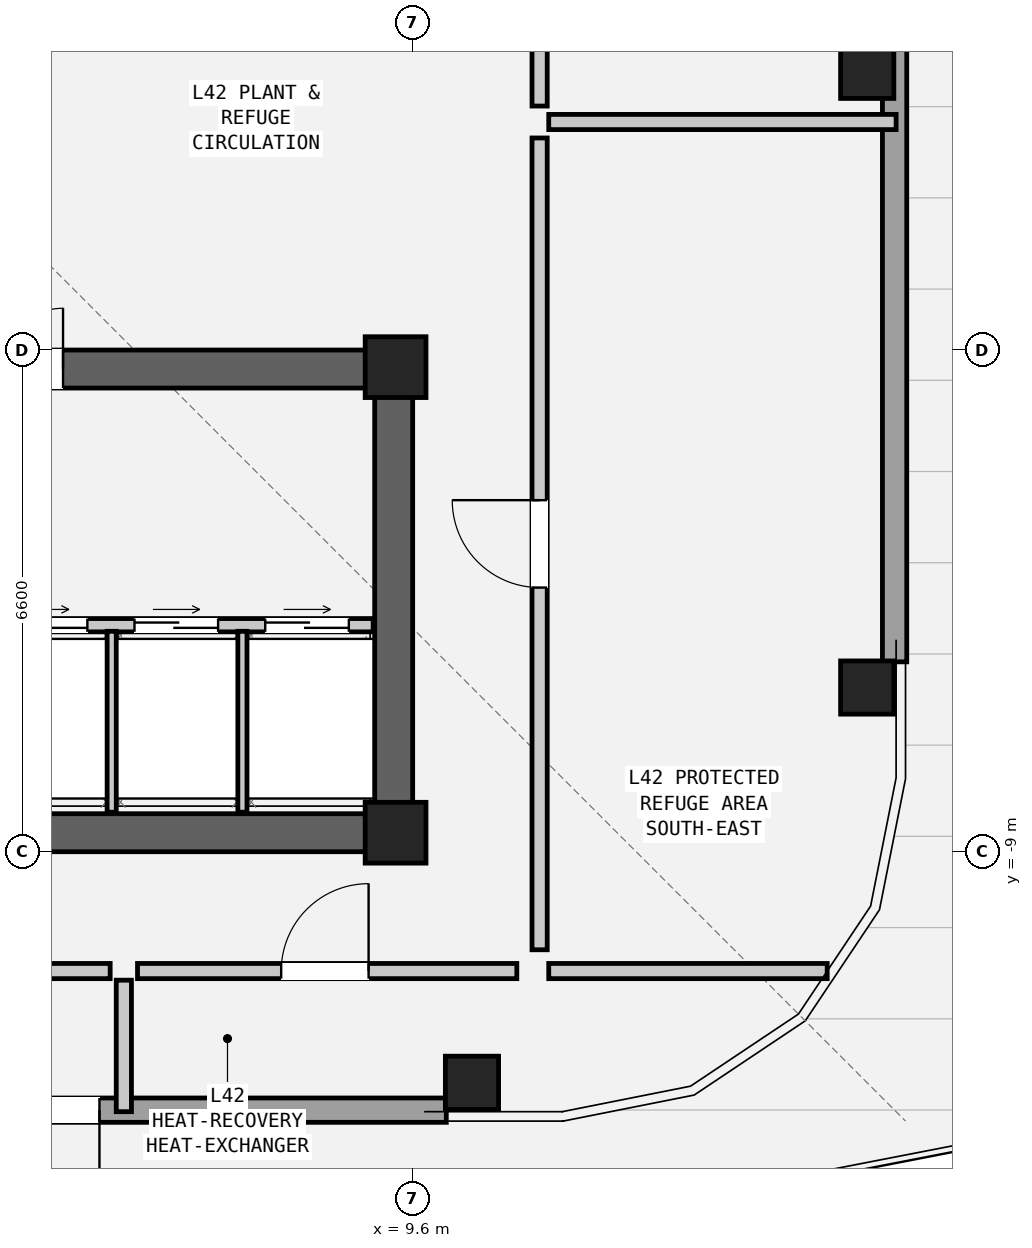
"""IFC4 building model, lengths in metres.
Left out: names, types, materials, properties, quantities, classifications, styles, units other than length and angle.
Written with IfcOpenShell. Run it as: python <this file> out.ifc"""

import sys

from ifc_helpers import new_model, si_unit, direction, frame, frame_2d, origin, origin_2d, place, context, subcontext, project, spatial, rectangle, hollow_rectangle, extrude, element, fill, save


model = new_model("IFC4")
c1 = context("Model", 3, precision=1e-05, world=origin(), true_north=direction((0.0, 1.0)))
c2 = subcontext(c1, "Body", "Model", "MODEL_VIEW")
j1 = project(units=[si_unit("LENGTHUNIT", "METRE"), si_unit("PLANEANGLEUNIT", "RADIAN")], contexts=[c1])
p1 = place(None, origin())
s1 = spatial("IfcSite", under=j1, at=p1, CompositionType="ELEMENT")
p2 = place(p1, origin())
s2 = spatial("IfcBuilding", under=s1, at=p2, CompositionType="ELEMENT")
p3 = place(p2, frame((0.0, 0.0, 144.6)))
s3 = spatial("IfcBuildingStorey", under=s2, at=p3, CompositionType="ELEMENT", Elevation=144.6)
p4 = place(p3, frame((-9.6, -8.75, 0.0), z_axis=(0.0, 0.0, 1.0), x_axis=(1.0, 0.0, 0.0)))
e1 = element("IfcWall", 1, at=p4, inside=s3, PredefinedType="SHEAR", context=c2, shape_type="SweptSolid", body=[
    extrude(rectangle(XDim=19.2, YDim=0.5, at=frame_2d((9.6, 0.0))), origin(), (0.0, 0.0, 1.0), 3.6),
])
p5 = place(p3, frame((-9.6, -2.65, 0.0), z_axis=(0.0, 0.0, 1.0), x_axis=(1.0, 0.0, 0.0)))
e2 = element("IfcWall", 2, at=p5, inside=s3, PredefinedType="SHEAR", context=c2, shape_type="SweptSolid", body=[
    extrude(rectangle(XDim=19.2, YDim=0.5, at=frame_2d((9.6, 0.0))), origin(), (0.0, 0.0, 1.0), 3.6),
])
p6 = place(p5, frame((3.8, 0.0, 0.0)))
e3 = element("IfcOpeningElement", 3, at=p6, cuts=e2, PredefinedType="OPENING", context=c2, shape_type="SweptSolid", body=[
    extrude(rectangle(XDim=1.1, YDim=2.08, at=frame_2d((0.55, 1.04))), frame((0.0, 0.262, 0.0), z_axis=(0.0, -1.0, 0.0), x_axis=(1.0, 0.0, 0.0)), (0.0, 0.0, 1.0), 0.524),
])
p7 = place(p5, frame((13.0, 0.0, 0.0)))
e4 = element("IfcOpeningElement", 4, at=p7, cuts=e2, PredefinedType="OPENING", context=c2, shape_type="SweptSolid", body=[
    extrude(rectangle(XDim=1.6, YDim=2.12, at=frame_2d((0.8, 1.06))), frame((0.0, 0.262, 0.0), z_axis=(0.0, -1.0, 0.0), x_axis=(1.0, 0.0, 0.0)), (0.0, 0.0, 1.0), 0.524),
])
p8 = place(p3, frame((9.35, -9.0, 0.0), z_axis=(0.0, 0.0, 1.0), x_axis=(0.0, 1.0, 0.0)))
e5 = element("IfcWall", 5, at=p8, inside=s3, PredefinedType="SHEAR", context=c2, shape_type="SweptSolid", body=[
    extrude(rectangle(XDim=6.6, YDim=0.5, at=frame_2d((3.3, 0.0))), origin(), (0.0, 0.0, 1.0), 3.6),
])
for number, where, z_axis, x_axis in (
    (6, (10.38, -12.04, 0.0), (0.0, 0.0, 1.0), (1.0, 0.0, 0.0)),
    (7, (15.58, -6.84, 0.0), (0.0, 0.0, 1.0), (0.0, 1.0, 0.0)),
    (8, (15.58, 1.26, 0.0), (0.0, 0.0, 1.0), (0.0, 1.0, 0.0)),
):
    element("IfcColumn", number, at=place(p3, frame(where, z_axis=z_axis, x_axis=x_axis)), inside=s3, PredefinedType="COLUMN", context=c2, shape_type="SweptSolid", body=[
        extrude(hollow_rectangle(XDim=0.7, YDim=0.7, WallThickness=0.045, at=origin_2d()), origin(), (0.0, 0.0, 1.0), 3.6),
    ])
for number, where, z_axis, x_axis in (
    (9, (9.375, -2.625, 0.0), (0.0, 0.0, 1.0), (1.0, 0.0, 0.0)),
    (10, (9.375, -8.75, 0.0), (0.0, 0.0, 1.0), (1.0, 0.0, 0.0)),
):
    element("IfcColumn", number, at=place(p3, frame(where, z_axis=z_axis, x_axis=x_axis)), inside=s3, PredefinedType="COLUMN", context=c2, shape_type="SweptSolid", body=[
        extrude(rectangle(XDim=0.8, YDim=0.8, at=origin_2d()), origin(), (0.0, 0.0, 1.0), 3.6),
    ])
p9 = place(p3, frame((10.042, -12.4, 0.0), z_axis=(0.0, 0.0, 1.0), x_axis=(-1.0, 0.0, 0.0)))
e11 = element("IfcWall", 11, at=p9, inside=s3, PredefinedType="SOLIDWALL", context=c2, shape_type="SweptSolid", body=[
    extrude(rectangle(XDim=23.624, YDim=0.32, at=frame_2d((11.812, 0.0))), origin(), (0.0, 0.0, 1.0), 2.242),
])
p10 = place(p9, frame((4.563, 0.0, 0.0)))
e12 = element("IfcOpeningElement", 12, at=p10, cuts=e11, PredefinedType="OPENING", context=c2, shape_type="SweptSolid", body=[
    extrude(rectangle(XDim=1.25, YDim=2.02, at=frame_2d((0.625, 1.01))), frame((0.0, 0.172, 0.0), z_axis=(0.0, -1.0, 0.0), x_axis=(1.0, 0.0, 0.0)), (0.0, 0.0, 1.0), 0.344),
])
p11 = place(p3, frame((15.94, 17.122, 0.0), z_axis=(0.0, 0.0, 1.0), x_axis=(0.0, -1.0, 0.0)))
e13 = element("IfcWall", 13, at=p11, inside=s3, PredefinedType="SOLIDWALL", context=c2, shape_type="SweptSolid", body=[
    extrude(rectangle(XDim=23.624, YDim=0.32, at=frame_2d((11.812, 0.0))), origin(), (0.0, 0.0, 1.0), 2.242),
])
p12 = place(p3, frame((0.0, -6.02, 0.0), z_axis=(0.0, 0.0, 1.0), x_axis=(1.0, 0.0, 0.0)))
e14 = element("IfcWall", 14, at=p12, inside=s3, PredefinedType="PARTITIONING", context=c2, shape_type="SweptSolid", body=[
    extrude(rectangle(XDim=9.08, YDim=0.175, at=frame_2d((4.54, 0.0))), origin(), (0.0, 0.0, 1.0), 3.38),
])
p13 = place(p12, frame((0.33, 0.0, 0.0)))
e15 = element("IfcOpeningElement", 15, at=p13, cuts=e14, PredefinedType="OPENING", context=c2, shape_type="SweptSolid", body=[
    extrude(rectangle(XDim=1.1, YDim=2.06, at=frame_2d((0.55, 1.03))), frame((0.0, 0.1, 0.0), z_axis=(0.0, -1.0, 0.0), x_axis=(1.0, 0.0, 0.0)), (0.0, 0.0, 1.0), 0.199),
])
p14 = place(p12, frame((2.3, 0.0, 0.0)))
e16 = element("IfcOpeningElement", 16, at=p14, cuts=e14, PredefinedType="OPENING", context=c2, shape_type="SweptSolid", body=[
    extrude(rectangle(XDim=1.1, YDim=2.06, at=frame_2d((0.55, 1.03))), frame((0.0, 0.1, 0.0), z_axis=(0.0, -1.0, 0.0), x_axis=(1.0, 0.0, 0.0)), (0.0, 0.0, 1.0), 0.199),
])
p15 = place(p12, frame((4.22, 0.0, 0.0)))
e17 = element("IfcOpeningElement", 17, at=p15, cuts=e14, PredefinedType="OPENING", context=c2, shape_type="SweptSolid", body=[
    extrude(rectangle(XDim=1.1, YDim=2.06, at=frame_2d((0.55, 1.03))), frame((0.0, 0.1, 0.0), z_axis=(0.0, -1.0, 0.0), x_axis=(1.0, 0.0, 0.0)), (0.0, 0.0, 1.0), 0.199),
])
p16 = place(p12, frame((5.94, 0.0, 0.0)))
e18 = element("IfcOpeningElement", 18, at=p16, cuts=e14, PredefinedType="OPENING", context=c2, shape_type="SweptSolid", body=[
    extrude(rectangle(XDim=1.1, YDim=2.06, at=frame_2d((0.55, 1.03))), frame((0.0, 0.1, 0.0), z_axis=(0.0, -1.0, 0.0), x_axis=(1.0, 0.0, 0.0)), (0.0, 0.0, 1.0), 0.199),
])
p17 = place(p12, frame((7.66, 0.0, 0.0)))
e19 = element("IfcOpeningElement", 19, at=p17, cuts=e14, PredefinedType="OPENING", context=c2, shape_type="SweptSolid", body=[
    extrude(rectangle(XDim=1.1, YDim=2.06, at=frame_2d((0.55, 1.03))), frame((0.0, 0.1, 0.0), z_axis=(0.0, -1.0, 0.0), x_axis=(1.0, 0.0, 0.0)), (0.0, 0.0, 1.0), 0.199),
])
for number, where, z_axis, x_axis in (
    (20, (5.64, -8.48, 0.0), (0.0, 0.0, 1.0), (0.0, 1.0, 0.0)),
    (21, (7.36, -8.48, 0.0), (0.0, 0.0, 1.0), (0.0, 1.0, 0.0)),
):
    element("IfcWall", number, at=place(p3, frame(where, z_axis=z_axis, x_axis=x_axis)), inside=s3, PredefinedType="PARTITIONING", context=c2, shape_type="SweptSolid", body=[
        extrude(rectangle(XDim=2.38, YDim=0.12, at=frame_2d((1.19, 0.0))), origin(), (0.0, 0.0, 1.0), 3.38),
    ])
p18 = place(p3, frame((0.53, -10.57, 0.0), z_axis=(0.0, 0.0, 1.0), x_axis=(1.0, 0.0, 0.0)))
e22 = element("IfcWall", 22, at=p18, inside=s3, PredefinedType="PARTITIONING", context=c2, shape_type="SweptSolid", body=[
    extrude(rectangle(XDim=5.09, YDim=0.2, at=frame_2d((2.545, 0.0))), origin(), (0.0, 0.0, 1.0), 3.38),
])
p19 = place(p18, frame((2.37, 0.0, 0.0)))
e23 = element("IfcOpeningElement", 23, at=p19, cuts=e22, PredefinedType="OPENING", context=c2, shape_type="SweptSolid", body=[
    extrude(rectangle(XDim=1.15, YDim=2.1, at=frame_2d((0.575, 1.05))), frame((0.0, 0.112, 0.0), z_axis=(0.0, -1.0, 0.0), x_axis=(1.0, 0.0, 0.0)), (0.0, 0.0, 1.0), 0.224),
])
p20 = place(p3, frame((5.8, -12.42, 0.0), z_axis=(0.0, 0.0, 1.0), x_axis=(0.0, 1.0, 0.0)))
e24 = element("IfcWall", 24, at=p20, inside=s3, PredefinedType="PARTITIONING", context=c2, shape_type="SweptSolid", body=[
    extrude(rectangle(XDim=1.73, YDim=0.2, at=frame_2d((0.865, 0.0))), origin(), (0.0, 0.0, 1.0), 2.901),
])
p21 = place(p3, frame((5.98, -10.57, 0.0), z_axis=(0.0, 0.0, 1.0), x_axis=(1.0, 0.0, 0.0)))
e25 = element("IfcWall", 25, at=p21, inside=s3, PredefinedType="PARTITIONING", context=c2, shape_type="SweptSolid", body=[
    extrude(rectangle(XDim=4.99, YDim=0.2, at=frame_2d((2.495, 0.0))), origin(), (0.0, 0.0, 1.0), 3.38),
])
p22 = place(p21, frame((1.89, 0.0, 0.0)))
e26 = element("IfcOpeningElement", 26, at=p22, cuts=e25, PredefinedType="OPENING", context=c2, shape_type="SweptSolid", body=[
    extrude(rectangle(XDim=1.15, YDim=2.1, at=frame_2d((0.575, 1.05))), frame((0.0, 0.112, 0.0), z_axis=(0.0, -1.0, 0.0), x_axis=(1.0, 0.0, 0.0)), (0.0, 0.0, 1.0), 0.224),
])
p23 = place(p3, frame((11.39, -10.57, 0.0), z_axis=(0.0, 0.0, 1.0), x_axis=(1.0, 0.0, 0.0)))
e27 = element("IfcWall", 27, at=p23, inside=s3, PredefinedType="PARTITIONING", context=c2, shape_type="SweptSolid", body=[
    extrude(rectangle(XDim=3.663, YDim=0.2, at=frame_2d((1.832, 0.0))), origin(), (0.0, 0.0, 1.0), 3.38),
])
p24 = place(p3, frame((11.39, 0.6, 0.0), z_axis=(0.0, 0.0, 1.0), x_axis=(1.0, 0.0, 0.0)))
e28 = element("IfcWall", 28, at=p24, inside=s3, PredefinedType="PARTITIONING", context=c2, shape_type="SweptSolid", body=[
    extrude(rectangle(XDim=4.57, YDim=0.2, at=frame_2d((2.285, 0.0))), origin(), (0.0, 0.0, 1.0), 2.901),
])
p25 = place(p3, frame((11.27, -10.29, 0.0), z_axis=(0.0, 0.0, 1.0), x_axis=(0.0, 1.0, 0.0)))
e29 = element("IfcWall", 29, at=p25, inside=s3, PredefinedType="PARTITIONING", context=c2, shape_type="SweptSolid", body=[
    extrude(rectangle(XDim=10.68, YDim=0.2, at=frame_2d((5.34, 0.0))), origin(), (0.0, 0.0, 1.0), 3.38),
])
p26 = place(p25, frame((4.765, 0.0, 0.0)))
e30 = element("IfcOpeningElement", 30, at=p26, cuts=e29, PredefinedType="OPENING", context=c2, shape_type="SweptSolid", body=[
    extrude(rectangle(XDim=1.15, YDim=2.1, at=frame_2d((0.575, 1.05))), frame((0.0, 0.112, 0.0), z_axis=(0.0, -1.0, 0.0), x_axis=(1.0, 0.0, 0.0)), (0.0, 0.0, 1.0), 0.224),
])
p27 = place(p3, frame((11.27, 0.81, 0.0), z_axis=(0.0, 0.0, 1.0), x_axis=(0.0, 1.0, 0.0)))
e31 = element("IfcWall", 31, at=p27, inside=s3, PredefinedType="PARTITIONING", context=c2, shape_type="SweptSolid", body=[
    extrude(rectangle(XDim=10.68, YDim=0.2, at=frame_2d((5.34, 0.0))), origin(), (0.0, 0.0, 1.0), 3.38),
])
p28 = place(p27, frame((6.047, 0.0, 0.0)))
e32 = element("IfcOpeningElement", 32, at=p28, cuts=e31, PredefinedType="OPENING", context=c2, shape_type="SweptSolid", body=[
    extrude(rectangle(XDim=1.15, YDim=2.1, at=frame_2d((0.575, 1.05))), frame((0.0, 0.112, 0.0), z_axis=(0.0, -1.0, 0.0), x_axis=(1.0, 0.0, 0.0)), (0.0, 0.0, 1.0), 0.224),
])
p29 = place(p10, origin())
e33 = element("IfcDoor", 33, at=p29, inside=s3, OperationType="SINGLE_SWING_LEFT", PredefinedType="DOOR", context=c2, shape_type="SweptSolid", body=[
    extrude(rectangle(XDim=1.25, YDim=2.02, at=frame_2d((0.625, 1.01))), frame((0.0, 0.025, 0.0), z_axis=(0.0, -1.0, 0.0), x_axis=(1.0, 0.0, 0.0)), (0.0, 0.0, 1.0), 0.05),
])
fill(e12, e33)
p30 = place(p7, origin())
e34 = element("IfcDoor", 34, at=p30, inside=s3, OperationType="DOUBLE_DOOR_SINGLE_SWING", PredefinedType="DOOR", context=c2, shape_type="SweptSolid", body=[
    extrude(rectangle(XDim=1.6, YDim=2.12, at=frame_2d((0.8, 1.06))), frame((0.0, 0.025, 0.0), z_axis=(0.0, -1.0, 0.0), x_axis=(1.0, 0.0, 0.0)), (0.0, 0.0, 1.0), 0.05),
])
fill(e4, e34)
p31 = place(p22, origin())
e35 = element("IfcDoor", 35, at=p31, inside=s3, OperationType="SINGLE_SWING_RIGHT", PredefinedType="DOOR", context=c2, shape_type="SweptSolid", body=[
    extrude(rectangle(XDim=1.15, YDim=2.1, at=frame_2d((0.575, 1.05))), frame((0.0, 0.025, 0.0), z_axis=(0.0, -1.0, 0.0), x_axis=(1.0, 0.0, 0.0)), (0.0, 0.0, 1.0), 0.05),
])
fill(e26, e35)
p32 = place(p26, origin())
e36 = element("IfcDoor", 36, at=p32, inside=s3, OperationType="SINGLE_SWING_RIGHT", PredefinedType="DOOR", context=c2, shape_type="SweptSolid", body=[
    extrude(rectangle(XDim=1.15, YDim=2.1, at=frame_2d((0.575, 1.05))), frame((0.0, 0.025, 0.0), z_axis=(0.0, -1.0, 0.0), x_axis=(1.0, 0.0, 0.0)), (0.0, 0.0, 1.0), 0.05),
])
fill(e30, e36)
p33 = place(p15, origin())
e37 = element("IfcDoor", 37, at=p33, inside=s3, OperationType="DOUBLE_DOOR_SLIDING", PredefinedType="DOOR", context=c2, shape_type="SweptSolid", body=[
    extrude(rectangle(XDim=1.1, YDim=2.06, at=frame_2d((0.55, 1.03))), frame((0.0, 0.025, 0.0), z_axis=(0.0, -1.0, 0.0), x_axis=(1.0, 0.0, 0.0)), (0.0, 0.0, 1.0), 0.05),
])
fill(e17, e37)
p34 = place(p16, origin())
e38 = element("IfcDoor", 38, at=p34, inside=s3, OperationType="DOUBLE_DOOR_SLIDING", PredefinedType="DOOR", context=c2, shape_type="SweptSolid", body=[
    extrude(rectangle(XDim=1.1, YDim=2.06, at=frame_2d((0.55, 1.03))), frame((0.0, 0.025, 0.0), z_axis=(0.0, -1.0, 0.0), x_axis=(1.0, 0.0, 0.0)), (0.0, 0.0, 1.0), 0.05),
])
fill(e18, e38)
p35 = place(p17, origin())
e39 = element("IfcDoor", 39, at=p35, inside=s3, OperationType="DOUBLE_DOOR_SLIDING", PredefinedType="DOOR", context=c2, shape_type="SweptSolid", body=[
    extrude(rectangle(XDim=1.1, YDim=2.06, at=frame_2d((0.55, 1.03))), frame((0.0, 0.025, 0.0), z_axis=(0.0, -1.0, 0.0), x_axis=(1.0, 0.0, 0.0)), (0.0, 0.0, 1.0), 0.05),
])
fill(e19, e39)
save(model, sys.argv[1])
